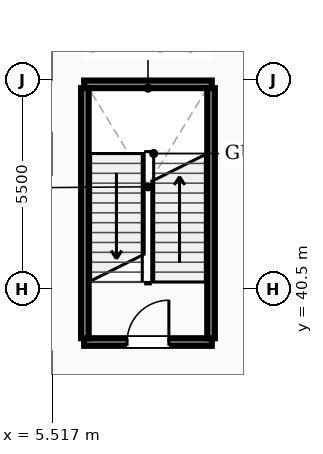
"""IFC4 building model, lengths in metres.
Left out: names, types, materials, properties, quantities, classifications, styles, units other than length and angle.
Written with IfcOpenShell. Run it as: python <this file> out.ifc"""

import sys

from ifc_helpers import new_model, si_unit, direction, frame, frame_2d, origin, place, context, subcontext, project, spatial, rectangle, extrude, element, fill, save


model = new_model("IFC4")
c1 = context("Model", 3, precision=1e-05, world=origin(), true_north=direction((0.0, 1.0)))
c2 = subcontext(c1, "Body", "Model", "MODEL_VIEW")
j1 = project(units=[si_unit("LENGTHUNIT", "METRE"), si_unit("PLANEANGLEUNIT", "RADIAN")], contexts=[c1])
p1 = place(None, origin())
s1 = spatial("IfcSite", under=j1, at=p1, CompositionType="ELEMENT")
p2 = place(p1, origin())
s2 = spatial("IfcBuilding", under=s1, at=p2, CompositionType="ELEMENT")
p3 = place(p2, frame((0.0, 0.0, -5.0)))
s3 = spatial("IfcBuildingStorey", under=s2, at=p3, CompositionType="ELEMENT", Elevation=-5.0)
p4 = place(p3, frame((6.36, 39.1, 0.0), z_axis=(0.0, 0.0, 1.0), x_axis=(1.0, 0.0, 0.0)))
e1 = element("IfcWall", 1, at=p4, inside=s3, PredefinedType="STANDARD", context=c2, shape_type="SweptSolid", body=[
    extrude(rectangle(XDim=3.36, YDim=0.2, at=frame_2d((1.68, 0.0))), origin(), (0.0, 0.0, 1.0), 4.75),
])
p5 = place(p4, frame((1.13, 0.0, 0.0)))
e2 = element("IfcOpeningElement", 2, at=p5, cuts=e1, PredefinedType="OPENING", context=c2, shape_type="SweptSolid", body=[
    extrude(rectangle(XDim=1.1, YDim=2.08, at=frame_2d((0.55, 1.04))), frame((0.0, 0.11, 0.0), z_axis=(0.0, -1.0, 0.0), x_axis=(1.0, 0.0, 0.0)), (0.0, 0.0, 1.0), 0.22),
])
p6 = place(p3, frame((6.36, 45.88, 0.0), z_axis=(0.0, 0.0, 1.0), x_axis=(1.0, 0.0, 0.0)))
e3 = element("IfcWall", 3, at=p6, inside=s3, PredefinedType="STANDARD", context=c2, shape_type="SweptSolid", body=[
    extrude(rectangle(XDim=3.36, YDim=0.2, at=frame_2d((1.68, 0.0))), origin(), (0.0, 0.0, 1.0), 4.75),
])
for number, where, z_axis, x_axis in (
    (4, (6.38, 39.2, 0.0), (0.0, 0.0, 1.0), (0.0, 1.0, 0.0)),
    (5, (9.7, 39.2, 0.0), (0.0, 0.0, 1.0), (0.0, 1.0, 0.0)),
):
    element("IfcWall", number, at=place(p3, frame(where, z_axis=z_axis, x_axis=x_axis)), inside=s3, PredefinedType="STANDARD", context=c2, shape_type="SweptSolid", body=[
        extrude(rectangle(XDim=6.58, YDim=0.2, at=frame_2d((3.29, 0.0))), origin(), (0.0, 0.0, 1.0), 4.75),
    ])
p7 = place(p5, origin())
e6 = element("IfcDoor", 6, at=p7, inside=s3, OperationType="SINGLE_SWING_RIGHT", PredefinedType="DOOR", context=c2, shape_type="SweptSolid", body=[
    extrude(rectangle(XDim=1.1, YDim=2.08, at=frame_2d((0.55, 1.04))), frame((0.0, 0.025, 0.0), z_axis=(0.0, -1.0, 0.0), x_axis=(1.0, 0.0, 0.0)), (0.0, 0.0, 1.0), 0.05),
])
fill(e2, e6)
save(model, sys.argv[1])
